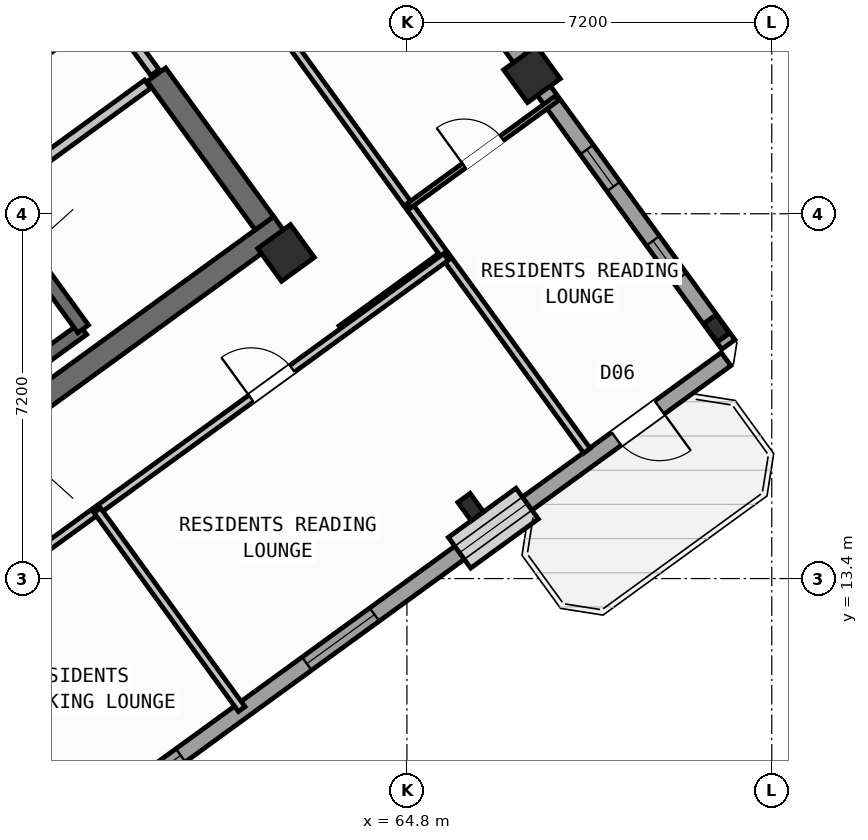
"""IFC4 building model, lengths in metres.
Left out: names, types, materials, properties, quantities, classifications, styles, units other than length and angle.
Written with IfcOpenShell. Run it as: python <this file> out.ifc"""

import sys

from ifc_helpers import new_model, si_unit, direction, frame, frame_2d, origin, origin_2d, place, context, subcontext, project, spatial, rectangle, hollow_rectangle, i_section, extrude, source, transform, mapped, element, fill, save


model = new_model("IFC4")
c1 = context("Model", 3, precision=1e-05, world=origin(), true_north=direction((0.0, 1.0)))
c2 = subcontext(c1, "Body", "Model", "MODEL_VIEW")
j1 = project(units=[si_unit("LENGTHUNIT", "METRE"), si_unit("PLANEANGLEUNIT", "RADIAN")], contexts=[c1])
p1 = place(None, origin())
s1 = spatial("IfcSite", under=j1, at=p1, CompositionType="ELEMENT")
p2 = place(p1, origin())
s2 = spatial("IfcBuilding", under=s1, at=p2, CompositionType="ELEMENT")
p3 = place(p2, frame((0.0, 0.0, 242.1)))
s3 = spatial("IfcBuildingStorey", under=s2, at=p3, CompositionType="ELEMENT", Elevation=242.1)
p4 = place(p3, frame((52.399, 13.169, 0.0), z_axis=(0.0, 0.0, 1.0), x_axis=(0.809022352778, 0.587777877013, 0.0)))
e1 = element("IfcWall", 1, at=p4, inside=s3, PredefinedType="SHEAR", context=c2, shape_type="SweptSolid", body=[
    extrude(rectangle(XDim=12.24, YDim=0.45, at=frame_2d((6.12, 0.0))), origin(), (0.0, 0.0, 1.0), 3.32),
])
p5 = place(p3, frame((61.988, 20.413, 0.0), z_axis=(0.0, 0.0, 1.0), x_axis=(-0.587819244441, 0.808992296542, 0.0)))
e2 = element("IfcWall", 2, at=p5, inside=s3, PredefinedType="SHEAR", context=c2, shape_type="SweptSolid", body=[
    extrude(rectangle(XDim=3.625, YDim=0.45, at=frame_2d((1.812, 0.0))), origin(), (0.0, 0.0, 1.0), 3.32),
])
m1 = source(origin(), c2, "Body", "SweptSolid", [
    extrude(i_section(OverallWidth=0.3, OverallDepth=0.45, WebThickness=0.014, FlangeThickness=0.026, at=origin_2d()), origin(), (0.0, 0.0, 1.0), 3.6),
])
p6 = place(p3, frame((66.058, 14.811, 0.0), z_axis=(0.0, 0.0, 1.0), x_axis=(0.809016994375, 0.587785252292, 0.0)))
e3 = element("IfcColumn", 3, at=p6, inside=s3, PredefinedType="COLUMN", context=c2, shape_type="MappedRepresentation", body=[
    mapped(m1, transform((0.0, 0.0, 0.0), scale=1.0)),
])
m2 = source(origin(), c2, "Body", "SweptSolid", [
    extrude(hollow_rectangle(XDim=0.8, YDim=0.8, WallThickness=0.032, at=origin_2d()), origin(), (0.0, 0.0, 1.0), 3.6),
])
p7 = place(p3, frame((62.414, 19.827, 0.0), z_axis=(0.0, 0.0, 1.0), x_axis=(0.809016994375, 0.587785252292, 0.0)))
e4 = element("IfcColumn", 4, at=p7, inside=s3, PredefinedType="COLUMN", context=c2, shape_type="MappedRepresentation", body=[
    mapped(m2, transform((0.0, 0.0, 0.0), scale=1.0)),
])
p8 = place(p3, frame((70.912, 18.338, 0.0), z_axis=(0.0, 0.0, 1.0), x_axis=(0.809016994375, 0.587785252292, 0.0)))
e5 = element("IfcColumn", 5, at=p8, inside=s3, PredefinedType="COLUMN", context=c2, shape_type="MappedRepresentation", body=[
    mapped(m1, transform((0.0, 0.0, 0.0), scale=1.0)),
])
p9 = place(p3, frame((67.268, 23.354, 0.0), z_axis=(0.0, 0.0, 1.0), x_axis=(0.809016994375, 0.587785252292, 0.0)))
e6 = element("IfcColumn", 6, at=p9, inside=s3, PredefinedType="COLUMN", context=c2, shape_type="MappedRepresentation", body=[
    mapped(m2, transform((0.0, 0.0, 0.0), scale=1.0)),
])
p10 = place(p3, frame((58.455, 35.484, 0.0), z_axis=(0.0, 0.0, 1.0), x_axis=(0.587783625747, -0.809018176127, 0.0)))
e7 = element("IfcWall", 7, at=p10, inside=s3, PredefinedType="STANDARD", context=c2, shape_type="SweptSolid", body=[
    extrude(rectangle(XDim=21.587, YDim=0.32, at=frame_2d((10.794, 0.0))), origin(), (0.0, 0.0, 1.0), 2.845),
])
p11 = place(p10, frame((1.554, 0.0, 0.9)))
e8 = element("IfcOpeningElement", 8, at=p11, cuts=e7, PredefinedType="OPENING", context=c2, shape_type="SweptSolid", body=[
    extrude(rectangle(XDim=1.65, YDim=1.45, at=frame_2d((0.825, 0.725))), frame((0.0, 0.17, 0.0), z_axis=(0.0, -1.0, 0.0), x_axis=(1.0, 0.0, 0.0)), (0.0, 0.0, 1.0), 0.34),
])
p12 = place(p10, frame((9.219, 0.0, 0.9)))
e9 = element("IfcOpeningElement", 9, at=p12, cuts=e7, PredefinedType="OPENING", context=c2, shape_type="SweptSolid", body=[
    extrude(rectangle(XDim=1.35, YDim=1.45, at=frame_2d((0.675, 0.725))), frame((0.0, 0.17, 0.0), z_axis=(0.0, -1.0, 0.0), x_axis=(1.0, 0.0, 0.0)), (0.0, 0.0, 1.0), 0.34),
])
p13 = place(p10, frame((12.119, 0.0, 0.9)))
e10 = element("IfcOpeningElement", 10, at=p13, cuts=e7, PredefinedType="OPENING", context=c2, shape_type="SweptSolid", body=[
    extrude(rectangle(XDim=1.35, YDim=1.45, at=frame_2d((0.675, 0.725))), frame((0.0, 0.17, 0.0), z_axis=(0.0, -1.0, 0.0), x_axis=(1.0, 0.0, 0.0)), (0.0, 0.0, 1.0), 0.34),
])
p14 = place(p10, frame((16.833, 0.0, 1.0)))
e11 = element("IfcOpeningElement", 11, at=p14, cuts=e7, PredefinedType="OPENING", context=c2, shape_type="SweptSolid", body=[
    extrude(rectangle(XDim=0.9, YDim=1.25, at=frame_2d((0.45, 0.625))), frame((0.0, 0.17, 0.0), z_axis=(0.0, -1.0, 0.0), x_axis=(1.0, 0.0, 0.0)), (0.0, 0.0, 1.0), 0.34),
])
p15 = place(p10, frame((19.057, 0.0, 1.0)))
e12 = element("IfcOpeningElement", 12, at=p15, cuts=e7, PredefinedType="OPENING", context=c2, shape_type="SweptSolid", body=[
    extrude(rectangle(XDim=0.9, YDim=1.25, at=frame_2d((0.45, 0.625))), frame((0.0, 0.17, 0.0), z_axis=(0.0, -1.0, 0.0), x_axis=(1.0, 0.0, 0.0)), (0.0, 0.0, 1.0), 0.34),
])
p16 = place(p3, frame((71.098, 17.731, 0.0), z_axis=(0.0, 0.0, 1.0), x_axis=(-0.809021120468, -0.587779573171, 0.0)))
e13 = element("IfcWall", 13, at=p16, inside=s3, PredefinedType="STANDARD", context=c2, shape_type="SweptSolid", body=[
    extrude(rectangle(XDim=17.588, YDim=0.32, at=frame_2d((8.794, 0.0))), origin(), (0.0, 0.0, 1.0), 3.32),
])
p17 = place(p16, frame((1.624, 0.0, 0.0)))
e14 = element("IfcOpeningElement", 14, at=p17, cuts=e13, PredefinedType="OPENING", context=c2, shape_type="SweptSolid", body=[
    extrude(rectangle(XDim=1.05, YDim=2.15, at=frame_2d((0.525, 1.075))), frame((0.0, 0.17, 0.0), z_axis=(0.0, -1.0, 0.0), x_axis=(1.0, 0.0, 0.0)), (0.0, 0.0, 1.0), 0.34),
])
p18 = place(p16, frame((4.851, 0.0, 0.9)))
e15 = element("IfcOpeningElement", 15, at=p18, cuts=e13, PredefinedType="OPENING", context=c2, shape_type="SweptSolid", body=[
    extrude(rectangle(XDim=1.65, YDim=1.45, at=frame_2d((0.825, 0.725))), frame((0.0, 0.17, 0.0), z_axis=(0.0, -1.0, 0.0), x_axis=(1.0, 0.0, 0.0)), (0.0, 0.0, 1.0), 0.34),
])
p19 = place(p16, frame((8.576, 0.0, 0.9)))
e16 = element("IfcOpeningElement", 16, at=p19, cuts=e13, PredefinedType="OPENING", context=c2, shape_type="SweptSolid", body=[
    extrude(rectangle(XDim=1.65, YDim=1.45, at=frame_2d((0.825, 0.725))), frame((0.0, 0.17, 0.0), z_axis=(0.0, -1.0, 0.0), x_axis=(1.0, 0.0, 0.0)), (0.0, 0.0, 1.0), 0.34),
])
p20 = place(p16, frame((13.304, 0.0, 0.95)))
e17 = element("IfcOpeningElement", 17, at=p20, cuts=e13, PredefinedType="OPENING", context=c2, shape_type="SweptSolid", body=[
    extrude(rectangle(XDim=1.95, YDim=1.35, at=frame_2d((0.975, 0.675))), frame((0.0, 0.17, 0.0), z_axis=(0.0, -1.0, 0.0), x_axis=(1.0, 0.0, 0.0)), (0.0, 0.0, 1.0), 0.34),
])
p21 = place(p3, frame((52.472, 14.013, 0.0), z_axis=(0.0, 0.0, 1.0), x_axis=(0.809028366311, 0.587769599847, 0.0)))
e18 = element("IfcWall", 18, at=p21, inside=s3, PredefinedType="SHEAR", context=c2, shape_type="SweptSolid", body=[
    extrude(rectangle(XDim=7.33, YDim=0.26, at=frame_2d((3.665, 0.0))), origin(), (0.0, 0.0, 1.0), 3.32),
])
p22 = place(p3, frame((58.41, 18.327, 0.0), z_axis=(0.0, 0.0, 1.0), x_axis=(-0.58776738483, 0.809029975545, 0.0)))
e19 = element("IfcWall", 19, at=p22, inside=s3, PredefinedType="SHEAR", context=c2, shape_type="SweptSolid", body=[
    extrude(rectangle(XDim=3.16, YDim=0.26, at=frame_2d((1.58, 0.0))), origin(), (0.0, 0.0, 1.0), 3.32),
])
p23 = place(p3, frame((56.553, 20.884, 0.0), z_axis=(0.0, 0.0, 1.0), x_axis=(0.809041669066, 0.587751288995, 0.0)))
e20 = element("IfcWall", 20, at=p23, inside=s3, PredefinedType="STANDARD", context=c2, shape_type="SweptSolid", body=[
    extrude(rectangle(XDim=3.868, YDim=0.2, at=frame_2d((1.934, 0.0))), origin(), (0.0, 0.0, 1.0), 3.31),
])
p24 = place(p23, frame((0.55, 0.0, 0.0)))
e21 = element("IfcOpeningElement", 21, at=p24, cuts=e20, PredefinedType="OPENING", context=c2, shape_type="SweptSolid", body=[
    extrude(rectangle(XDim=0.86, YDim=2.05, at=frame_2d((0.43, 1.025))), frame((0.0, 0.11, 0.0), z_axis=(0.0, -1.0, 0.0), x_axis=(1.0, 0.0, 0.0)), (0.0, 0.0, 1.0), 0.22),
])
p25 = place(p3, frame((54.421, 21.436, 0.0), z_axis=(0.0, 0.0, 1.0), x_axis=(0.809013710463, 0.587789772183, 0.0)))
e22 = element("IfcWall", 22, at=p25, inside=s3, PredefinedType="PARTITIONING", context=c2, shape_type="SweptSolid", body=[
    extrude(rectangle(XDim=5.36, YDim=0.16, at=frame_2d((2.68, 0.0))), origin(), (0.0, 0.0, 1.0), 3.31),
])
p26 = place(p25, frame((1.4, 0.0, 0.0)))
e23 = element("IfcOpeningElement", 23, at=p26, cuts=e22, PredefinedType="OPENING", context=c2, shape_type="SweptSolid", body=[
    extrude(rectangle(XDim=0.86, YDim=2.05, at=frame_2d((0.43, 1.025))), frame((0.0, 0.09, 0.0), z_axis=(0.0, -1.0, 0.0), x_axis=(1.0, 0.0, 0.0)), (0.0, 0.0, 1.0), 0.18),
])
p27 = place(p3, frame((53.425, 22.468, 0.0), z_axis=(0.0, 0.0, 1.0), x_axis=(0.809015945709, 0.587786695655, 0.0)))
e24 = element("IfcWall", 24, at=p27, inside=s3, PredefinedType="STANDARD", context=c2, shape_type="SweptSolid", body=[
    extrude(rectangle(XDim=5.468, YDim=0.2, at=frame_2d((2.734, 0.0))), origin(), (0.0, 0.0, 1.0), 3.31),
])
p28 = place(p27, frame((4.4, 0.0, 0.0)))
e25 = element("IfcOpeningElement", 25, at=p28, cuts=e24, PredefinedType="OPENING", context=c2, shape_type="SweptSolid", body=[
    extrude(rectangle(XDim=0.86, YDim=2.05, at=frame_2d((0.43, 1.025))), frame((0.0, 0.11, 0.0), z_axis=(0.0, -1.0, 0.0), x_axis=(1.0, 0.0, 0.0)), (0.0, 0.0, 1.0), 0.22),
])
p29 = place(p27, frame((1.45, 0.0, 0.0)))
e26 = element("IfcOpeningElement", 26, at=p29, cuts=e24, PredefinedType="OPENING", context=c2, shape_type="SweptSolid", body=[
    extrude(rectangle(XDim=0.86, YDim=2.05, at=frame_2d((0.43, 1.025))), frame((0.0, 0.11, 0.0), z_axis=(0.0, -1.0, 0.0), x_axis=(1.0, 0.0, 0.0)), (0.0, 0.0, 1.0), 0.22),
])
p30 = place(p3, frame((59.827, 23.386, 0.0), z_axis=(0.0, 0.0, 1.0), x_axis=(-0.587803840107, 0.809003489211, 0.0)))
e27 = element("IfcWall", 27, at=p30, inside=s3, PredefinedType="STANDARD", context=c2, shape_type="SweptSolid", body=[
    extrude(rectangle(XDim=2.96, YDim=0.2, at=frame_2d((1.48, 0.0))), origin(), (0.0, 0.0, 1.0), 3.31),
])
p31 = place(p30, frame((1.68, 0.0, 0.0)))
e28 = element("IfcOpeningElement", 28, at=p31, cuts=e27, PredefinedType="OPENING", context=c2, shape_type="SweptSolid", body=[
    extrude(rectangle(XDim=1.0, YDim=2.1, at=frame_2d((0.5, 1.05))), frame((0.0, 0.11, 0.0), z_axis=(0.0, -1.0, 0.0), x_axis=(1.0, 0.0, 0.0)), (0.0, 0.0, 1.0), 0.22),
])
p32 = place(p3, frame((63.507, 18.322, 0.0), z_axis=(0.0, 0.0, 1.0), x_axis=(0.809034604122, 0.587761013791, 0.0)))
e29 = element("IfcWall", 29, at=p32, inside=s3, PredefinedType="PARTITIONING", context=c2, shape_type="SweptSolid", body=[
    extrude(rectangle(XDim=2.51, YDim=0.16, at=frame_2d((1.255, 0.0))), origin(), (0.0, 0.0, 1.0), 3.31),
])
p33 = place(p3, frame((68.353, 15.922, 0.0), z_axis=(0.0, 0.0, 1.0), x_axis=(-0.587782002009, 0.809019355834, 0.0)))
e30 = element("IfcWall", 30, at=p33, inside=s3, PredefinedType="PARTITIONING", context=c2, shape_type="SweptSolid", body=[
    extrude(rectangle(XDim=15.35, YDim=0.16, at=frame_2d((7.675, 0.0))), origin(), (0.0, 0.0, 1.0), 3.31),
])
p34 = place(p3, frame((64.839, 20.759, 0.0), z_axis=(0.0, 0.0, 1.0), x_axis=(0.809013833588, 0.587789602718, 0.0)))
e31 = element("IfcWall", 31, at=p34, inside=s3, PredefinedType="PARTITIONING", context=c2, shape_type="SweptSolid", body=[
    extrude(rectangle(XDim=3.61, YDim=0.11, at=frame_2d((1.805, 0.0))), origin(), (0.0, 0.0, 1.0), 3.31),
])
p35 = place(p34, frame((1.345, 0.0, 0.0)))
e32 = element("IfcOpeningElement", 32, at=p35, cuts=e31, PredefinedType="OPENING", context=c2, shape_type="SweptSolid", body=[
    extrude(rectangle(XDim=0.92, YDim=2.08, at=frame_2d((0.46, 1.04))), frame((0.0, 0.065, 0.0), z_axis=(0.0, -1.0, 0.0), x_axis=(1.0, 0.0, 0.0)), (0.0, 0.0, 1.0), 0.13),
])
p36 = place(p3, frame((53.705, 11.126, 0.0), z_axis=(0.0, 0.0, 1.0), x_axis=(0.809014504436, 0.587788679384, 0.0)))
e33 = element("IfcWall", 33, at=p36, inside=s3, PredefinedType="PARTITIONING", context=c2, shape_type="SweptSolid", body=[
    extrude(rectangle(XDim=14.67, YDim=0.16, at=frame_2d((7.335, 0.0))), origin(), (0.0, 0.0, 1.0), 3.31),
])
p37 = place(p36, frame((3.215, 0.0, 0.0)))
e34 = element("IfcOpeningElement", 34, at=p37, cuts=e33, PredefinedType="OPENING", context=c2, shape_type="SweptSolid", body=[
    extrude(rectangle(XDim=1.0, YDim=2.1, at=frame_2d((0.5, 1.05))), frame((0.0, 0.09, 0.0), z_axis=(0.0, -1.0, 0.0), x_axis=(1.0, 0.0, 0.0)), (0.0, 0.0, 1.0), 0.18),
])
p38 = place(p36, frame((9.915, 0.0, 0.0)))
e35 = element("IfcOpeningElement", 35, at=p38, cuts=e33, PredefinedType="OPENING", context=c2, shape_type="SweptSolid", body=[
    extrude(rectangle(XDim=1.0, YDim=2.1, at=frame_2d((0.5, 1.05))), frame((0.0, 0.09, 0.0), z_axis=(0.0, -1.0, 0.0), x_axis=(1.0, 0.0, 0.0)), (0.0, 0.0, 1.0), 0.18),
])
p39 = place(p3, frame((57.747, 7.586, 0.0), z_axis=(0.0, 0.0, 1.0), x_axis=(-0.587784893399, 0.809017255126, 0.0)))
e36 = element("IfcWall", 36, at=p39, inside=s3, PredefinedType="PARTITIONING", context=c2, shape_type="SweptSolid", body=[
    extrude(rectangle(XDim=5.48, YDim=0.16, at=frame_2d((2.74, 0.0))), origin(), (0.0, 0.0, 1.0), 3.31),
])
p40 = place(p3, frame((61.539, 10.823, 0.0), z_axis=(0.0, 0.0, 1.0), x_axis=(-0.587785532001, 0.809016791155, 0.0)))
e37 = element("IfcWall", 37, at=p40, inside=s3, PredefinedType="PARTITIONING", context=c2, shape_type="SweptSolid", body=[
    extrude(rectangle(XDim=4.85, YDim=0.16, at=frame_2d((2.425, 0.0))), origin(), (0.0, 0.0, 1.0), 3.31),
])
m3 = source(origin(), c2, "Body", "SweptSolid", [
    extrude(rectangle(XDim=1.05, YDim=2.15, at=frame_2d((0.525, 1.075))), frame((0.0, 0.025, 0.0), z_axis=(0.0, -1.0, 0.0), x_axis=(1.0, 0.0, 0.0)), (0.0, 0.0, 1.0), 0.05),
])
p41 = place(p17, origin())
e38 = element("IfcDoor", 38, at=p41, inside=s3, OperationType="SINGLE_SWING_LEFT", PredefinedType="DOOR", context=c2, shape_type="MappedRepresentation", body=[
    mapped(m3, transform((0.0, 0.0, 0.0), scale=1.0)),
])
fill(e14, e38)
m4 = source(origin(), c2, "Body", "SweptSolid", [
    extrude(rectangle(XDim=0.9, YDim=1.25, at=frame_2d((0.45, 0.625))), frame((0.0, 0.03, 0.0), z_axis=(0.0, -1.0, 0.0), x_axis=(1.0, 0.0, 0.0)), (0.0, 0.0, 1.0), 0.06),
])
p42 = place(p14, origin())
e39 = element("IfcWindow", 39, at=p42, inside=s3, PartitioningType="SINGLE_PANEL", PredefinedType="WINDOW", context=c2, shape_type="MappedRepresentation", body=[
    mapped(m4, transform((0.0, 0.0, 0.0), scale=1.0)),
])
fill(e11, e39)
p43 = place(p15, origin())
e40 = element("IfcWindow", 40, at=p43, inside=s3, PartitioningType="SINGLE_PANEL", PredefinedType="WINDOW", context=c2, shape_type="MappedRepresentation", body=[
    mapped(m4, transform((0.0, 0.0, 0.0), scale=1.0)),
])
fill(e12, e40)
m5 = source(origin(), c2, "Body", "SweptSolid", [
    extrude(rectangle(XDim=1.65, YDim=1.45, at=frame_2d((0.825, 0.725))), frame((0.0, 0.03, 0.0), z_axis=(0.0, -1.0, 0.0), x_axis=(1.0, 0.0, 0.0)), (0.0, 0.0, 1.0), 0.06),
])
p44 = place(p18, origin())
e41 = element("IfcWindow", 41, at=p44, inside=s3, PartitioningType="SINGLE_PANEL", PredefinedType="WINDOW", context=c2, shape_type="MappedRepresentation", body=[
    mapped(m5, transform((0.0, 0.0, 0.0), scale=1.0)),
])
fill(e15, e41)
p45 = place(p19, origin())
e42 = element("IfcWindow", 42, at=p45, inside=s3, PartitioningType="SINGLE_PANEL", PredefinedType="WINDOW", context=c2, shape_type="MappedRepresentation", body=[
    mapped(m5, transform((0.0, 0.0, 0.0), scale=1.0)),
])
fill(e16, e42)
m6 = source(origin(), c2, "Body", "SweptSolid", [
    extrude(rectangle(XDim=1.95, YDim=1.35, at=frame_2d((0.975, 0.675))), frame((0.0, 0.03, 0.0), z_axis=(0.0, -1.0, 0.0), x_axis=(1.0, 0.0, 0.0)), (0.0, 0.0, 1.0), 0.06),
])
p46 = place(p20, origin())
e43 = element("IfcWindow", 43, at=p46, inside=s3, PartitioningType="SINGLE_PANEL", PredefinedType="WINDOW", context=c2, shape_type="MappedRepresentation", body=[
    mapped(m6, transform((0.0, 0.0, 0.0), scale=1.0)),
])
fill(e17, e43)
m7 = source(origin(), c2, "Body", "SweptSolid", [
    extrude(rectangle(XDim=0.92, YDim=2.08, at=frame_2d((0.46, 1.04))), frame((0.0, 0.025, 0.0), z_axis=(0.0, -1.0, 0.0), x_axis=(1.0, 0.0, 0.0)), (0.0, 0.0, 1.0), 0.05),
])
p47 = place(p35, origin())
e44 = element("IfcDoor", 44, at=p47, inside=s3, OperationType="SINGLE_SWING_LEFT", PredefinedType="DOOR", context=c2, shape_type="MappedRepresentation", body=[
    mapped(m7, transform((0.0, 0.0, 0.0), scale=1.0)),
])
fill(e32, e44)
m8 = source(origin(), c2, "Body", "SweptSolid", [
    extrude(rectangle(XDim=1.0, YDim=2.1, at=frame_2d((0.5, 1.05))), frame((0.0, 0.025, 0.0), z_axis=(0.0, -1.0, 0.0), x_axis=(1.0, 0.0, 0.0)), (0.0, 0.0, 1.0), 0.05),
])
p48 = place(p38, origin())
e45 = element("IfcDoor", 45, at=p48, inside=s3, OperationType="SINGLE_SWING_LEFT", PredefinedType="DOOR", context=c2, shape_type="MappedRepresentation", body=[
    mapped(m8, transform((0.0, 0.0, 0.0), scale=1.0)),
])
fill(e35, e45)
save(model, sys.argv[1])
